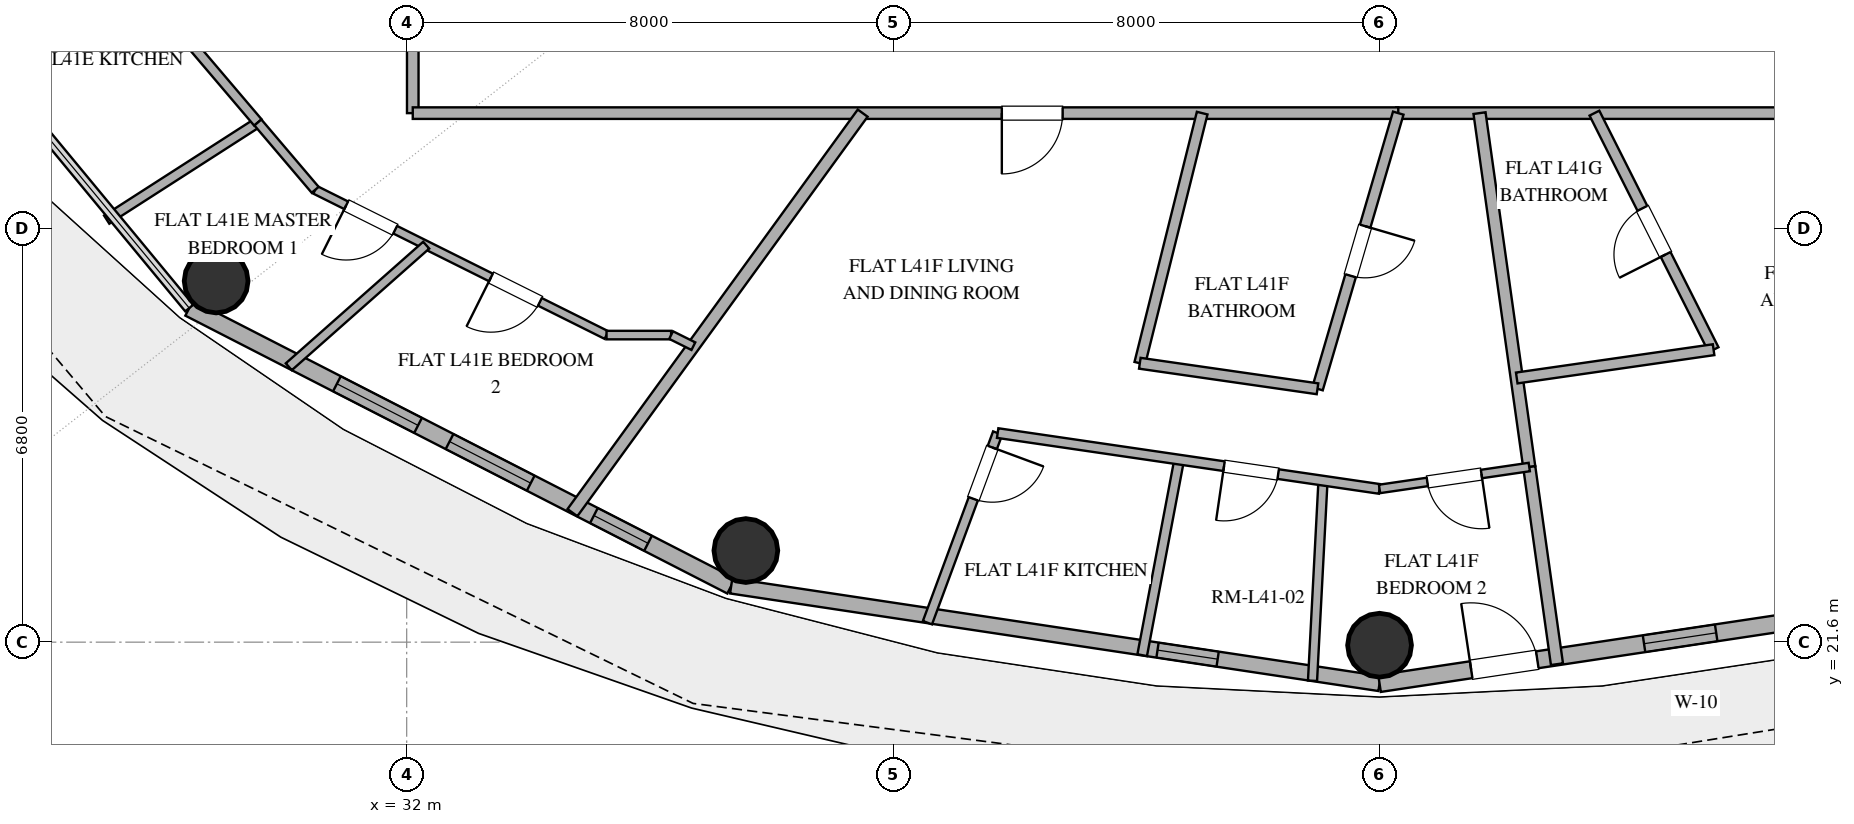
"""IFC4 building model, lengths in metres.
Left out: names, types, materials, properties, quantities, classifications, styles, units other than length and angle.
Written with IfcOpenShell. Run it as: python <this file> out.ifc"""

import sys

from ifc_helpers import new_model, si_unit, direction, frame, frame_2d, origin, origin_2d, place, context, subcontext, project, spatial, rectangle, hollow_circle, extrude, element, fill, save


model = new_model("IFC4")
c1 = context("Model", 3, precision=1e-05, world=origin(), true_north=direction((0.0, 1.0)))
c2 = subcontext(c1, "Body", "Model", "MODEL_VIEW")
j1 = project(units=[si_unit("LENGTHUNIT", "METRE"), si_unit("PLANEANGLEUNIT", "RADIAN")], contexts=[c1])
p1 = place(None, origin())
s1 = spatial("IfcSite", under=j1, at=p1, CompositionType="ELEMENT")
p2 = place(p1, origin())
s2 = spatial("IfcBuilding", under=s1, at=p2, CompositionType="ELEMENT")
p3 = place(p2, frame((0.0, 0.0, 165.0)))
s3 = spatial("IfcBuildingStorey", under=s2, at=p3, CompositionType="ELEMENT", Elevation=165.0)
for number, where, z_axis, x_axis in (
    (1, (28.866, 27.54, 0.0), (0.0, 0.0, 1.0), (1.0, 0.0, 0.0)),
    (2, (37.578, 23.107, 0.0), (0.0, 0.0, 1.0), (1.0, 0.0, 0.0)),
    (3, (48.0, 21.55, 0.0), (0.0, 0.0, 1.0), (1.0, 0.0, 0.0)),
):
    element("IfcColumn", number, at=place(p3, frame(where, z_axis=z_axis, x_axis=x_axis)), inside=s3, PredefinedType="COLUMN", context=c2, shape_type="SweptSolid", body=[
        extrude(hollow_circle(Radius=0.525, WallThickness=0.028, at=origin_2d()), origin(), (0.0, 0.0, 1.0), 3.38),
    ])
p4 = place(p3, frame((28.424, 27.094, 0.0), z_axis=(0.0, 0.0, 1.0), x_axis=(0.889872523182, -0.456209263919, 0.0)))
e4 = element("IfcWall", 4, at=p4, inside=s3, PredefinedType="SOLIDWALL", context=c2, shape_type="SweptSolid", body=[
    extrude(rectangle(XDim=10.016, YDim=0.28, at=frame_2d((5.008, 0.0))), origin(), (0.0, 0.0, 1.0), 3.38),
])
p5 = place(p4, frame((2.729, 0.0, 0.85)))
e5 = element("IfcOpeningElement", 5, at=p5, cuts=e4, PredefinedType="OPENING", context=c2, shape_type="SweptSolid", body=[
    extrude(rectangle(XDim=1.5, YDim=1.8, at=frame_2d((0.75, 0.9))), frame((0.0, 0.15, 0.0), z_axis=(0.0, -1.0, 0.0), x_axis=(1.0, 0.0, 0.0)), (0.0, 0.0, 1.0), 0.3),
])
p6 = place(p4, frame((4.811, 0.0, 0.85)))
e6 = element("IfcOpeningElement", 6, at=p6, cuts=e4, PredefinedType="OPENING", context=c2, shape_type="SweptSolid", body=[
    extrude(rectangle(XDim=1.5, YDim=1.8, at=frame_2d((0.75, 0.9))), frame((0.0, 0.15, 0.0), z_axis=(0.0, -1.0, 0.0), x_axis=(1.0, 0.0, 0.0)), (0.0, 0.0, 1.0), 0.3),
])
p7 = place(p4, frame((7.479, 0.0, 0.85)))
e7 = element("IfcOpeningElement", 7, at=p7, cuts=e4, PredefinedType="OPENING", context=c2, shape_type="SweptSolid", body=[
    extrude(rectangle(XDim=1.0, YDim=1.8, at=frame_2d((0.5, 0.9))), frame((0.0, 0.15, 0.0), z_axis=(0.0, -1.0, 0.0), x_axis=(1.0, 0.0, 0.0)), (0.0, 0.0, 1.0), 0.3),
])
p8 = place(p3, frame((37.337, 22.525, 0.0), z_axis=(0.0, 0.0, 1.0), x_axis=(0.988863993413, -0.148822049884, 0.0)))
e8 = element("IfcWall", 8, at=p8, inside=s3, PredefinedType="SOLIDWALL", context=c2, shape_type="SweptSolid", body=[
    extrude(rectangle(XDim=10.783, YDim=0.25, at=frame_2d((5.392, 0.0))), origin(), (0.0, 0.0, 1.0), 3.38),
])
p9 = place(p8, frame((7.09, 0.0, 1.42)))
e9 = element("IfcOpeningElement", 9, at=p9, cuts=e8, PredefinedType="OPENING", context=c2, shape_type="SweptSolid", body=[
    extrude(rectangle(XDim=1.0, YDim=1.05, at=frame_2d((0.5, 0.525))), frame((0.0, 0.135, 0.0), z_axis=(0.0, -1.0, 0.0), x_axis=(1.0, 0.0, 0.0)), (0.0, 0.0, 1.0), 0.27),
])
p10 = place(p3, frame((48.0, 20.92, 0.0), z_axis=(0.0, 0.0, 1.0), x_axis=(0.988863993413, 0.148822049884, 0.0)))
e10 = element("IfcWall", 10, at=p10, inside=s3, PredefinedType="SOLIDWALL", context=c2, shape_type="SweptSolid", body=[
    extrude(rectangle(XDim=10.783, YDim=0.28, at=frame_2d((5.392, 0.0))), origin(), (0.0, 0.0, 1.0), 3.38),
])
p11 = place(p10, frame((1.524, 0.0, 0.0)))
e11 = element("IfcOpeningElement", 11, at=p11, cuts=e10, PredefinedType="OPENING", context=c2, shape_type="SweptSolid", body=[
    extrude(rectangle(XDim=1.1, YDim=2.25, at=frame_2d((0.55, 1.125))), frame((0.0, 0.15, 0.0), z_axis=(0.0, -1.0, 0.0), x_axis=(1.0, 0.0, 0.0)), (0.0, 0.0, 1.0), 0.3),
])
p12 = place(p10, frame((4.399, 0.0, 0.85)))
e12 = element("IfcOpeningElement", 12, at=p12, cuts=e10, PredefinedType="OPENING", context=c2, shape_type="SweptSolid", body=[
    extrude(rectangle(XDim=1.2, YDim=1.6, at=frame_2d((0.6, 0.8))), frame((0.0, 0.15, 0.0), z_axis=(0.0, -1.0, 0.0), x_axis=(1.0, 0.0, 0.0)), (0.0, 0.0, 1.0), 0.3),
])
p13 = place(p10, frame((6.815, 0.0, 0.85)))
e13 = element("IfcOpeningElement", 13, at=p13, cuts=e10, PredefinedType="OPENING", context=c2, shape_type="SweptSolid", body=[
    extrude(rectangle(XDim=1.2, YDim=1.6, at=frame_2d((0.6, 0.8))), frame((0.0, 0.15, 0.0), z_axis=(0.0, -1.0, 0.0), x_axis=(1.0, 0.0, 0.0)), (0.0, 0.0, 1.0), 0.3),
])
p14 = place(p3, frame((63.9, 30.3, 0.0), z_axis=(0.0, 0.0, 1.0), x_axis=(-1.0, 0.0, 0.0)))
e14 = element("IfcWall", 14, at=p14, inside=s3, PredefinedType="PARTITIONING", context=c2, shape_type="SweptSolid", body=[
    extrude(rectangle(XDim=15.625, YDim=0.19, at=frame_2d((7.813, 0.0))), origin(), (0.0, 0.0, 1.0), 2.74),
])
p15 = place(p14, frame((6.137, 0.0, 0.0)))
e15 = element("IfcOpeningElement", 15, at=p15, cuts=e14, PredefinedType="OPENING", context=c2, shape_type="SweptSolid", body=[
    extrude(rectangle(XDim=1.0, YDim=2.2, at=frame_2d((0.5, 1.1))), frame((0.0, 0.105, 0.0), z_axis=(0.0, -1.0, 0.0), x_axis=(1.0, 0.0, 0.0)), (0.0, 0.0, 1.0), 0.21),
])
p16 = place(p3, frame((32.1, 30.3, 0.0), z_axis=(0.0, 0.0, 1.0), x_axis=(0.0, 1.0, 0.0)))
e16 = element("IfcWall", 16, at=p16, inside=s3, PredefinedType="PARTITIONING", context=c2, shape_type="SweptSolid", body=[
    extrude(rectangle(XDim=10.62, YDim=0.19, at=frame_2d((5.31, 0.0))), origin(), (0.0, 0.0, 1.0), 2.74),
])
p17 = place(p16, frame((3.475, 0.0, 0.0)))
e17 = element("IfcOpeningElement", 17, at=p17, cuts=e16, PredefinedType="OPENING", context=c2, shape_type="SweptSolid", body=[
    extrude(rectangle(XDim=1.0, YDim=2.2, at=frame_2d((0.5, 1.1))), frame((0.0, 0.105, 0.0), z_axis=(0.0, -1.0, 0.0), x_axis=(1.0, 0.0, 0.0)), (0.0, 0.0, 1.0), 0.21),
])
p18 = place(p3, frame((48.308, 30.3, 0.0), z_axis=(0.0, 0.0, 1.0), x_axis=(-1.0, 0.0, 0.0)))
e18 = element("IfcWall", 18, at=p18, inside=s3, PredefinedType="PARTITIONING", context=c2, shape_type="SweptSolid", body=[
    extrude(rectangle(XDim=16.208, YDim=0.19, at=frame_2d((8.104, 0.0))), origin(), (0.0, 0.0, 1.0), 2.74),
])
p19 = place(p18, frame((5.52, 0.0, 0.0)))
e19 = element("IfcOpeningElement", 19, at=p19, cuts=e18, PredefinedType="OPENING", context=c2, shape_type="SweptSolid", body=[
    extrude(rectangle(XDim=1.0, YDim=2.2, at=frame_2d((0.5, 1.1))), frame((0.0, 0.105, 0.0), z_axis=(0.0, -1.0, 0.0), x_axis=(1.0, 0.0, 0.0)), (0.0, 0.0, 1.0), 0.21),
])
p20 = place(p3, frame((34.726, 23.73, 0.0), z_axis=(0.0, 0.0, 1.0), x_axis=(0.587785528328, 0.809016793823, 0.0)))
e20 = element("IfcWall", 20, at=p20, inside=s3, PredefinedType="PARTITIONING", context=c2, shape_type="SweptSolid", body=[
    extrude(rectangle(XDim=8.121, YDim=0.2, at=frame_2d((4.061, 0.0))), origin(), (0.0, 0.0, 1.0), 2.74),
])
p21 = place(p3, frame((48.308, 30.3, 0.0), z_axis=(0.0, 0.0, 1.0), x_axis=(-0.281192482413, -0.9596513887, 0.0)))
e21 = element("IfcWall", 21, at=p21, inside=s3, PredefinedType="PLUMBINGWALL", context=c2, shape_type="SweptSolid", body=[
    extrude(rectangle(XDim=4.724, YDim=0.18, at=frame_2d((2.362, 0.0))), origin(), (0.0, 0.0, 1.0), 2.74),
])
p22 = place(p21, frame((1.937, 0.0, 0.0)))
e22 = element("IfcOpeningElement", 22, at=p22, cuts=e21, PredefinedType="OPENING", context=c2, shape_type="SweptSolid", body=[
    extrude(rectangle(XDim=0.85, YDim=2.1, at=frame_2d((0.425, 1.05))), frame((0.0, 0.1, 0.0), z_axis=(0.0, -1.0, 0.0), x_axis=(1.0, 0.0, 0.0)), (0.0, 0.0, 1.0), 0.2),
])
p23 = place(p3, frame((49.644, 30.3, 0.0), z_axis=(0.0, 0.0, 1.0), x_axis=(0.139158723068, -0.990270089316, 0.0)))
e23 = element("IfcWall", 23, at=p23, inside=s3, PredefinedType="PARTITIONING", context=c2, shape_type="SweptSolid", body=[
    extrude(rectangle(XDim=5.877, YDim=0.2, at=frame_2d((2.938, 0.0))), origin(), (0.0, 0.0, 1.0), 2.74),
])
p24 = place(p3, frame((53.494, 26.41, 0.0), z_axis=(0.0, 0.0, 1.0), x_axis=(-0.449879384809, 0.89308932315, 0.0)))
e24 = element("IfcWall", 24, at=p24, inside=s3, PredefinedType="PLUMBINGWALL", context=c2, shape_type="SweptSolid", body=[
    extrude(rectangle(XDim=4.356, YDim=0.18, at=frame_2d((2.178, 0.0))), origin(), (0.0, 0.0, 1.0), 2.74),
])
p25 = place(p24, frame((1.753, 0.0, 0.0)))
e25 = element("IfcOpeningElement", 25, at=p25, cuts=e24, PredefinedType="OPENING", context=c2, shape_type="SweptSolid", body=[
    extrude(rectangle(XDim=0.85, YDim=2.1, at=frame_2d((0.425, 1.05))), frame((0.0, 0.1, 0.0), z_axis=(0.0, -1.0, 0.0), x_axis=(1.0, 0.0, 0.0)), (0.0, 0.0, 1.0), 0.2),
])
p26 = place(p3, frame((44.057, 26.187, 0.0), z_axis=(0.0, 0.0, 1.0), x_axis=(0.241939344098, 0.97029137571, 0.0)))
e26 = element("IfcWall", 26, at=p26, inside=s3, PredefinedType="PLUMBINGWALL", context=c2, shape_type="SweptSolid", body=[
    extrude(rectangle(XDim=4.239, YDim=0.18, at=frame_2d((2.12, 0.0))), origin(), (0.0, 0.0, 1.0), 2.74),
])
p27 = place(p3, frame((35.287, 26.65, 0.0), z_axis=(0.0, 0.0, 1.0), x_axis=(-0.894937323042, 0.44619187333, 0.0)))
e27 = element("IfcWall", 27, at=p27, inside=s3, PredefinedType="PARTITIONING", context=c2, shape_type="SweptSolid", body=[
    extrude(rectangle(XDim=5.354, YDim=0.14, at=frame_2d((2.677, 0.0))), origin(), (0.0, 0.0, 1.0), 2.74),
])
p28 = place(p27, frame((1.224, 0.0, 0.0)))
e28 = element("IfcOpeningElement", 28, at=p28, cuts=e27, PredefinedType="OPENING", context=c2, shape_type="SweptSolid", body=[
    extrude(rectangle(XDim=0.9, YDim=2.1, at=frame_2d((0.45, 1.05))), frame((0.0, 0.08, 0.0), z_axis=(0.0, -1.0, 0.0), x_axis=(1.0, 0.0, 0.0)), (0.0, 0.0, 1.0), 0.16),
])
p29 = place(p27, frame((3.884, 0.0, 0.0)))
e29 = element("IfcOpeningElement", 29, at=p29, cuts=e27, PredefinedType="OPENING", context=c2, shape_type="SweptSolid", body=[
    extrude(rectangle(XDim=0.9, YDim=2.1, at=frame_2d((0.45, 1.05))), frame((0.0, 0.08, 0.0), z_axis=(0.0, -1.0, 0.0), x_axis=(1.0, 0.0, 0.0)), (0.0, 0.0, 1.0), 0.16),
])
p30 = place(p3, frame((41.719, 25.039, 0.0), z_axis=(0.0, 0.0, 1.0), x_axis=(-0.347266531909, -0.937766471898, 0.0)))
e30 = element("IfcWall", 30, at=p30, inside=s3, PredefinedType="PLUMBINGWALL", context=c2, shape_type="SweptSolid", body=[
    extrude(rectangle(XDim=3.325, YDim=0.16, at=frame_2d((1.663, 0.0))), origin(), (0.0, 0.0, 1.0), 2.74),
])
p31 = place(p30, frame((0.253, 0.0, 0.0)))
e31 = element("IfcOpeningElement", 31, at=p31, cuts=e30, PredefinedType="OPENING", context=c2, shape_type="SweptSolid", body=[
    extrude(rectangle(XDim=0.9, YDim=2.1, at=frame_2d((0.45, 1.05))), frame((0.0, 0.09, 0.0), z_axis=(0.0, -1.0, 0.0), x_axis=(1.0, 0.0, 0.0)), (0.0, 0.0, 1.0), 0.18),
])
p32 = place(p3, frame((46.898, 20.965, 0.0), z_axis=(0.0, 0.0, 1.0), x_axis=(0.052302203263, 0.998631303101, 0.0)))
e32 = element("IfcWall", 32, at=p32, inside=s3, PredefinedType="PARTITIONING", context=c2, shape_type="SweptSolid", body=[
    extrude(rectangle(XDim=3.295, YDim=0.15, at=frame_2d((1.648, 0.0))), origin(), (0.0, 0.0, 1.0), 2.74),
])
p33 = place(p3, frame((50.462, 24.48, 0.0), z_axis=(0.0, 0.0, 1.0), x_axis=(0.139145146576, -0.990271997072, 0.0)))
e33 = element("IfcWall", 33, at=p33, inside=s3, PredefinedType="PARTITIONING", context=c2, shape_type="SweptSolid", body=[
    extrude(rectangle(XDim=3.274, YDim=0.2, at=frame_2d((1.637, 0.0))), origin(), (0.0, 0.0, 1.0), 2.74),
])
p34 = place(p3, frame((44.096, 21.386, 0.0), z_axis=(0.0, 0.0, 1.0), x_axis=(0.186049333211, 0.982540404061, 0.0)))
e34 = element("IfcWall", 34, at=p34, inside=s3, PredefinedType="PLUMBINGWALL", context=c2, shape_type="SweptSolid", body=[
    extrude(rectangle(XDim=3.273, YDim=0.16, at=frame_2d((1.636, 0.0))), origin(), (0.0, 0.0, 1.0), 2.74),
])
p35 = place(p3, frame((50.257, 25.944, 0.0), z_axis=(0.0, 0.0, 1.0), x_axis=(0.989826700743, 0.142278257286, 0.0)))
e35 = element("IfcWall", 35, at=p35, inside=s3, PredefinedType="PLUMBINGWALL", context=c2, shape_type="SweptSolid", body=[
    extrude(rectangle(XDim=3.271, YDim=0.18, at=frame_2d((1.635, 0.0))), origin(), (0.0, 0.0, 1.0), 2.74),
])
p36 = place(p3, frame((48.0, 24.12, 0.0), z_axis=(0.0, 0.0, 1.0), x_axis=(-0.989475575411, 0.144699985022, 0.0)))
e36 = element("IfcWall", 36, at=p36, inside=s3, PredefinedType="PLUMBINGWALL", context=c2, shape_type="SweptSolid", body=[
    extrude(rectangle(XDim=6.347, YDim=0.16, at=frame_2d((3.174, 0.0))), origin(), (0.0, 0.0, 1.0), 2.74),
])
p37 = place(p36, frame((1.685, 0.0, 0.0)))
e37 = element("IfcOpeningElement", 37, at=p37, cuts=e36, PredefinedType="OPENING", context=c2, shape_type="SweptSolid", body=[
    extrude(rectangle(XDim=0.9, YDim=2.1, at=frame_2d((0.45, 1.05))), frame((0.0, 0.09, 0.0), z_axis=(0.0, -1.0, 0.0), x_axis=(1.0, 0.0, 0.0)), (0.0, 0.0, 1.0), 0.18),
])
p38 = place(p3, frame((32.321, 28.128, 0.0), z_axis=(0.0, 0.0, 1.0), x_axis=(-0.748956405403, -0.6626192744, 0.0)))
e38 = element("IfcWall", 38, at=p38, inside=s3, PredefinedType="PARTITIONING", context=c2, shape_type="SweptSolid", body=[
    extrude(rectangle(XDim=3.017, YDim=0.15, at=frame_2d((1.509, 0.0))), origin(), (0.0, 0.0, 1.0), 2.74),
])
p39 = place(p3, frame((29.553, 30.146, 0.0), z_axis=(0.0, 0.0, 1.0), x_axis=(-0.841296531109, -0.540573904978, 0.0)))
e39 = element("IfcWall", 39, at=p39, inside=s3, PredefinedType="PLUMBINGWALL", context=c2, shape_type="SweptSolid", body=[
    extrude(rectangle(XDim=2.956, YDim=0.16, at=frame_2d((1.478, 0.0))), origin(), (0.0, 0.0, 1.0), 2.74),
])
p40 = place(p3, frame((46.979, 25.767, 0.0), z_axis=(0.0, 0.0, 1.0), x_axis=(-0.989820071869, 0.142324366588, 0.0)))
e40 = element("IfcWall", 40, at=p40, inside=s3, PredefinedType="PLUMBINGWALL", context=c2, shape_type="SweptSolid", body=[
    extrude(rectangle(XDim=2.952, YDim=0.18, at=frame_2d((1.476, 0.0))), origin(), (0.0, 0.0, 1.0), 2.74),
])
p41 = place(p3, frame((50.462, 24.48, 0.0), z_axis=(0.0, 0.0, 1.0), x_axis=(-0.989489157172, -0.144607080872, 0.0)))
e41 = element("IfcWall", 41, at=p41, inside=s3, PredefinedType="PARTITIONING", context=c2, shape_type="SweptSolid", body=[
    extrude(rectangle(XDim=2.489, YDim=0.14, at=frame_2d((1.244, 0.0))), origin(), (0.0, 0.0, 1.0), 2.74),
])
p42 = place(p41, frame((0.794, 0.0, 0.0)))
e42 = element("IfcOpeningElement", 42, at=p42, cuts=e41, PredefinedType="OPENING", context=c2, shape_type="SweptSolid", body=[
    extrude(rectangle(XDim=0.9, YDim=2.1, at=frame_2d((0.45, 1.05))), frame((0.0, 0.08, 0.0), z_axis=(0.0, -1.0, 0.0), x_axis=(1.0, 0.0, 0.0)), (0.0, 0.0, 1.0), 0.16),
])
p43 = place(p3, frame((28.45, 31.443, 0.0), z_axis=(0.0, 0.0, 1.0), x_axis=(0.64788149294, -0.761741144422, 0.0)))
e43 = element("IfcWall", 43, at=p43, inside=s3, PredefinedType="PLUMBINGWALL", context=c2, shape_type="SweptSolid", body=[
    extrude(rectangle(XDim=1.702, YDim=0.16, at=frame_2d((0.851, 0.0))), origin(), (0.0, 0.0, 1.0), 2.74),
])
p44 = place(p3, frame((29.553, 30.146, 0.0), z_axis=(0.0, 0.0, 1.0), x_axis=(0.647896934681, -0.761728010533, 0.0)))
e44 = element("IfcWall", 44, at=p44, inside=s3, PredefinedType="PARTITIONING", context=c2, shape_type="SweptSolid", body=[
    extrude(rectangle(XDim=1.454, YDim=0.15, at=frame_2d((0.727, 0.0))), origin(), (0.0, 0.0, 1.0), 2.74),
])
p45 = place(p3, frame((36.349, 26.65, 0.0), z_axis=(0.0, 0.0, 1.0), x_axis=(-1.0, 0.0, 0.0)))
e45 = element("IfcWall", 45, at=p45, inside=s3, PredefinedType="PARTITIONING", context=c2, shape_type="SweptSolid", body=[
    extrude(rectangle(XDim=1.062, YDim=0.14, at=frame_2d((0.531, 0.0))), origin(), (0.0, 0.0, 1.0), 2.74),
])
p46 = place(p3, frame((36.715, 26.468, 0.0), z_axis=(0.0, 0.0, 1.0), x_axis=(-0.895142158028, 0.445780794698, 0.0)))
e46 = element("IfcWall", 46, at=p46, inside=s3, PredefinedType="PARTITIONING", context=c2, shape_type="SweptSolid", body=[
    extrude(rectangle(XDim=0.409, YDim=0.14, at=frame_2d((0.205, 0.0))), origin(), (0.0, 0.0, 1.0), 2.74),
])
p47 = place(p5, origin())
e47 = element("IfcWindow", 47, at=p47, inside=s3, PartitioningType="SINGLE_PANEL", PredefinedType="WINDOW", context=c2, shape_type="SweptSolid", body=[
    extrude(rectangle(XDim=1.5, YDim=1.8, at=frame_2d((0.75, 0.9))), frame((0.0, 0.03, 0.0), z_axis=(0.0, -1.0, 0.0), x_axis=(1.0, 0.0, 0.0)), (0.0, 0.0, 1.0), 0.06),
])
fill(e5, e47)
p48 = place(p6, origin())
e48 = element("IfcWindow", 48, at=p48, inside=s3, PartitioningType="SINGLE_PANEL", PredefinedType="WINDOW", context=c2, shape_type="SweptSolid", body=[
    extrude(rectangle(XDim=1.5, YDim=1.8, at=frame_2d((0.75, 0.9))), frame((0.0, 0.03, 0.0), z_axis=(0.0, -1.0, 0.0), x_axis=(1.0, 0.0, 0.0)), (0.0, 0.0, 1.0), 0.06),
])
fill(e6, e48)
p49 = place(p7, origin())
e49 = element("IfcWindow", 49, at=p49, inside=s3, PartitioningType="SINGLE_PANEL", PredefinedType="WINDOW", context=c2, shape_type="SweptSolid", body=[
    extrude(rectangle(XDim=1.0, YDim=1.8, at=frame_2d((0.5, 0.9))), frame((0.0, 0.03, 0.0), z_axis=(0.0, -1.0, 0.0), x_axis=(1.0, 0.0, 0.0)), (0.0, 0.0, 1.0), 0.06),
])
fill(e7, e49)
p50 = place(p11, origin())
e50 = element("IfcDoor", 50, at=p50, inside=s3, OperationType="SINGLE_SWING_LEFT", PredefinedType="DOOR", context=c2, shape_type="SweptSolid", body=[
    extrude(rectangle(XDim=1.1, YDim=2.25, at=frame_2d((0.55, 1.125))), frame((0.0, 0.025, 0.0), z_axis=(0.0, -1.0, 0.0), x_axis=(1.0, 0.0, 0.0)), (0.0, 0.0, 1.0), 0.05),
])
fill(e11, e50)
p51 = place(p12, origin())
e51 = element("IfcWindow", 51, at=p51, inside=s3, PartitioningType="SINGLE_PANEL", PredefinedType="WINDOW", context=c2, shape_type="SweptSolid", body=[
    extrude(rectangle(XDim=1.2, YDim=1.6, at=frame_2d((0.6, 0.8))), frame((0.0, 0.03, 0.0), z_axis=(0.0, -1.0, 0.0), x_axis=(1.0, 0.0, 0.0)), (0.0, 0.0, 1.0), 0.06),
])
fill(e12, e51)
p52 = place(p9, origin())
e52 = element("IfcWindow", 52, at=p52, inside=s3, PartitioningType="SINGLE_PANEL", PredefinedType="WINDOW", context=c2, shape_type="SweptSolid", body=[
    extrude(rectangle(XDim=1.0, YDim=1.05, at=frame_2d((0.5, 0.525))), frame((0.0, 0.03, 0.0), z_axis=(0.0, -1.0, 0.0), x_axis=(1.0, 0.0, 0.0)), (0.0, 0.0, 1.0), 0.06),
])
fill(e9, e52)
p53 = place(p19, origin())
e53 = element("IfcDoor", 53, at=p53, inside=s3, OperationType="SINGLE_SWING_RIGHT", PredefinedType="DOOR", context=c2, shape_type="SweptSolid", body=[
    extrude(rectangle(XDim=1.0, YDim=2.2, at=frame_2d((0.5, 1.1))), frame((0.0, 0.025, 0.0), z_axis=(0.0, -1.0, 0.0), x_axis=(1.0, 0.0, 0.0)), (0.0, 0.0, 1.0), 0.05),
])
fill(e19, e53)
p54 = place(p22, origin())
e54 = element("IfcDoor", 54, at=p54, inside=s3, OperationType="SINGLE_SWING_LEFT", PredefinedType="DOOR", context=c2, shape_type="SweptSolid", body=[
    extrude(rectangle(XDim=0.85, YDim=2.1, at=frame_2d((0.425, 1.05))), frame((0.0, 0.025, 0.0), z_axis=(0.0, -1.0, 0.0), x_axis=(1.0, 0.0, 0.0)), (0.0, 0.0, 1.0), 0.05),
])
fill(e22, e54)
p55 = place(p25, origin())
e55 = element("IfcDoor", 55, at=p55, inside=s3, OperationType="SINGLE_SWING_LEFT", PredefinedType="DOOR", context=c2, shape_type="SweptSolid", body=[
    extrude(rectangle(XDim=0.85, YDim=2.1, at=frame_2d((0.425, 1.05))), frame((0.0, 0.025, 0.0), z_axis=(0.0, -1.0, 0.0), x_axis=(1.0, 0.0, 0.0)), (0.0, 0.0, 1.0), 0.05),
])
fill(e25, e55)
p56 = place(p28, origin())
e56 = element("IfcDoor", 56, at=p56, inside=s3, OperationType="SINGLE_SWING_RIGHT", PredefinedType="DOOR", context=c2, shape_type="SweptSolid", body=[
    extrude(rectangle(XDim=0.9, YDim=2.1, at=frame_2d((0.45, 1.05))), frame((0.0, 0.025, 0.0), z_axis=(0.0, -1.0, 0.0), x_axis=(1.0, 0.0, 0.0)), (0.0, 0.0, 1.0), 0.05),
])
fill(e28, e56)
p57 = place(p29, origin())
e57 = element("IfcDoor", 57, at=p57, inside=s3, OperationType="SINGLE_SWING_RIGHT", PredefinedType="DOOR", context=c2, shape_type="SweptSolid", body=[
    extrude(rectangle(XDim=0.9, YDim=2.1, at=frame_2d((0.45, 1.05))), frame((0.0, 0.025, 0.0), z_axis=(0.0, -1.0, 0.0), x_axis=(1.0, 0.0, 0.0)), (0.0, 0.0, 1.0), 0.05),
])
fill(e29, e57)
p58 = place(p31, origin())
e58 = element("IfcDoor", 58, at=p58, inside=s3, OperationType="SINGLE_SWING_LEFT", PredefinedType="DOOR", context=c2, shape_type="SweptSolid", body=[
    extrude(rectangle(XDim=0.9, YDim=2.1, at=frame_2d((0.45, 1.05))), frame((0.0, 0.025, 0.0), z_axis=(0.0, -1.0, 0.0), x_axis=(1.0, 0.0, 0.0)), (0.0, 0.0, 1.0), 0.05),
])
fill(e31, e58)
p59 = place(p37, origin())
e59 = element("IfcDoor", 59, at=p59, inside=s3, OperationType="SINGLE_SWING_RIGHT", PredefinedType="DOOR", context=c2, shape_type="SweptSolid", body=[
    extrude(rectangle(XDim=0.9, YDim=2.1, at=frame_2d((0.45, 1.05))), frame((0.0, 0.025, 0.0), z_axis=(0.0, -1.0, 0.0), x_axis=(1.0, 0.0, 0.0)), (0.0, 0.0, 1.0), 0.05),
])
fill(e37, e59)
p60 = place(p42, origin())
e60 = element("IfcDoor", 60, at=p60, inside=s3, OperationType="SINGLE_SWING_LEFT", PredefinedType="DOOR", context=c2, shape_type="SweptSolid", body=[
    extrude(rectangle(XDim=0.9, YDim=2.1, at=frame_2d((0.45, 1.05))), frame((0.0, 0.025, 0.0), z_axis=(0.0, -1.0, 0.0), x_axis=(1.0, 0.0, 0.0)), (0.0, 0.0, 1.0), 0.05),
])
fill(e42, e60)
save(model, sys.argv[1])
